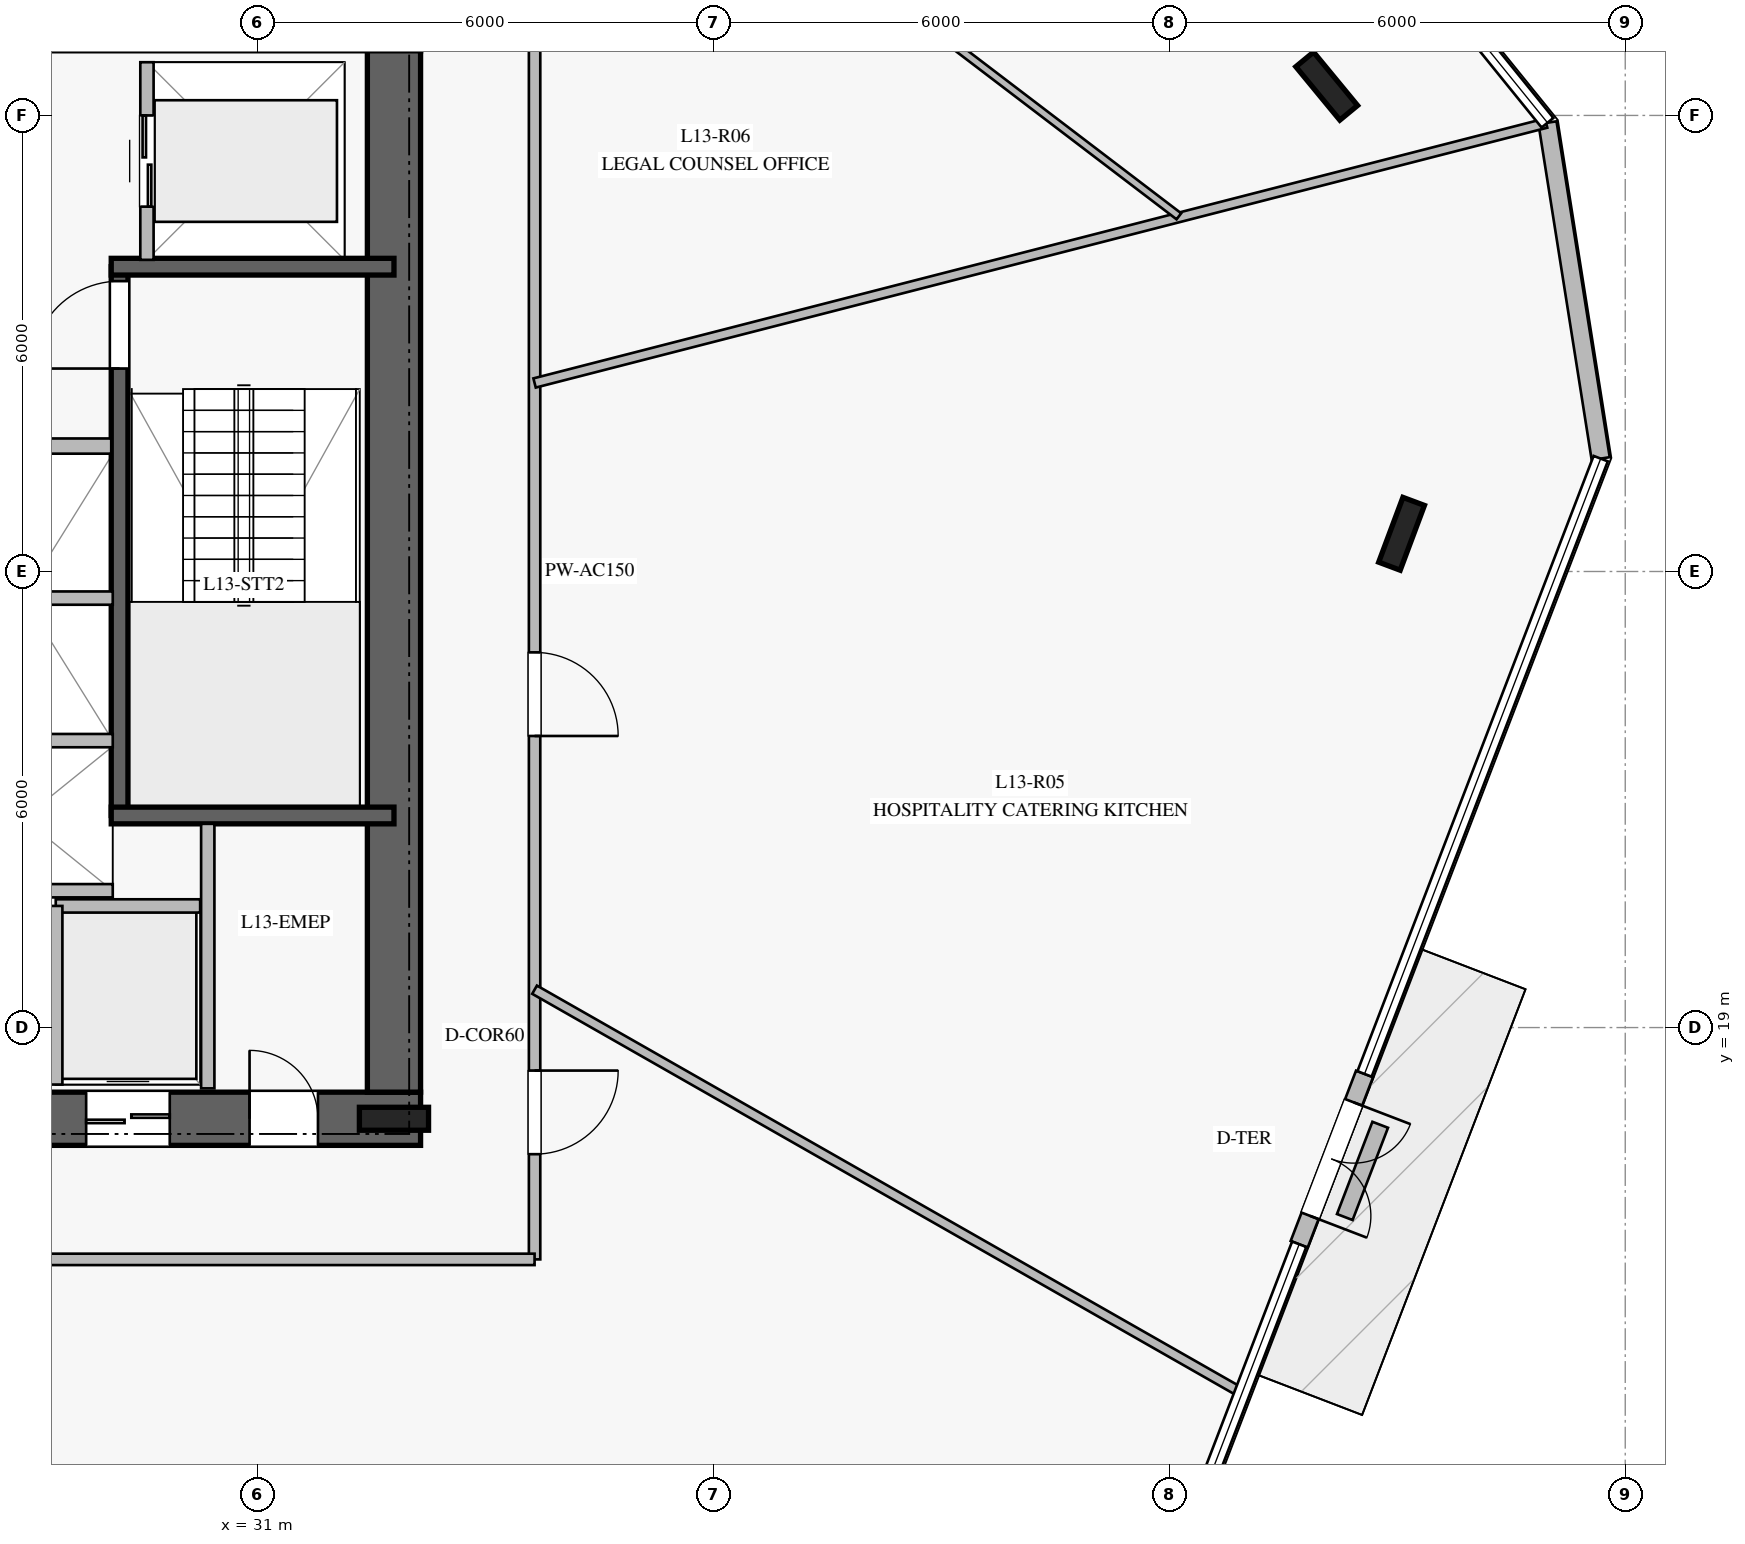
"""IFC4 building model, lengths in metres.
Left out: names, types, materials, properties, quantities, classifications, styles, units other than length and angle.
Written with IfcOpenShell. Run it as: python <this file> out.ifc"""

import sys

from ifc_helpers import new_model, si_unit, direction, frame, frame_2d, origin, origin_2d, place, context, subcontext, project, spatial, rectangle, i_section, extrude, element, fill, save


model = new_model("IFC4")
c1 = context("Model", 3, precision=1e-05, world=origin(), true_north=direction((0.0, 1.0)))
c2 = subcontext(c1, "Body", "Model", "MODEL_VIEW")
j1 = project(units=[si_unit("LENGTHUNIT", "METRE"), si_unit("PLANEANGLEUNIT", "RADIAN")], contexts=[c1])
p1 = place(None, origin())
s1 = spatial("IfcSite", under=j1, at=p1, CompositionType="ELEMENT")
p2 = place(p1, origin())
s2 = spatial("IfcBuilding", under=s1, at=p2, CompositionType="ELEMENT")
p3 = place(p2, frame((0.0, 0.0, 56.0)))
s3 = spatial("IfcBuildingStorey", under=s2, at=p3, CompositionType="ELEMENT", Elevation=56.0)
p4 = place(p3, frame((16.85, 17.8, 0.0), z_axis=(0.0, 0.0, 1.0), x_axis=(1.0, 0.0, 0.0)))
e1 = element("IfcWall", 1, at=p4, inside=s3, PredefinedType="SHEAR", context=c2, shape_type="SweptSolid", body=[
    extrude(rectangle(XDim=16.3, YDim=0.7, at=frame_2d((8.15, 0.0))), origin(), (0.0, 0.0, 1.0), 3.76),
])
p5 = place(p4, frame((5.1, 0.0, 0.0)))
e2 = element("IfcOpeningElement", 2, at=p5, cuts=e1, PredefinedType="OPENING", context=c2, shape_type="SweptSolid", body=[
    extrude(rectangle(XDim=1.2, YDim=2.25, at=frame_2d((0.6, 1.125))), frame((0.0, 0.36, 0.0), z_axis=(0.0, -1.0, 0.0), x_axis=(1.0, 0.0, 0.0)), (0.0, 0.0, 1.0), 0.72),
])
p6 = place(p4, frame((14.05, 0.0, 0.0)))
e3 = element("IfcOpeningElement", 3, at=p6, cuts=e1, PredefinedType="OPENING", context=c2, shape_type="SweptSolid", body=[
    extrude(rectangle(XDim=0.9, YDim=2.1, at=frame_2d((0.45, 1.05))), frame((0.0, 0.36, 0.0), z_axis=(0.0, -1.0, 0.0), x_axis=(1.0, 0.0, 0.0)), (0.0, 0.0, 1.0), 0.72),
])
p7 = place(p4, frame((7.95, 0.0, 0.0)))
e4 = element("IfcOpeningElement", 4, at=p7, cuts=e1, PredefinedType="OPENING", context=c2, shape_type="SweptSolid", body=[
    extrude(rectangle(XDim=1.1, YDim=2.2, at=frame_2d((0.55, 1.1))), frame((0.0, 0.36, 0.0), z_axis=(0.0, -1.0, 0.0), x_axis=(1.0, 0.0, 0.0)), (0.0, 0.0, 1.0), 0.72),
])
p8 = place(p4, frame((9.925, 0.0, 0.0)))
e5 = element("IfcOpeningElement", 5, at=p8, cuts=e1, PredefinedType="OPENING", context=c2, shape_type="SweptSolid", body=[
    extrude(rectangle(XDim=1.1, YDim=2.2, at=frame_2d((0.55, 1.1))), frame((0.0, 0.36, 0.0), z_axis=(0.0, -1.0, 0.0), x_axis=(1.0, 0.0, 0.0)), (0.0, 0.0, 1.0), 0.72),
])
p9 = place(p4, frame((11.9, 0.0, 0.0)))
e6 = element("IfcOpeningElement", 6, at=p9, cuts=e1, PredefinedType="OPENING", context=c2, shape_type="SweptSolid", body=[
    extrude(rectangle(XDim=1.1, YDim=2.2, at=frame_2d((0.55, 1.1))), frame((0.0, 0.36, 0.0), z_axis=(0.0, -1.0, 0.0), x_axis=(1.0, 0.0, 0.0)), (0.0, 0.0, 1.0), 0.72),
])
p10 = place(p3, frame((32.8, 18.15, 0.0), z_axis=(0.0, 0.0, 1.0), x_axis=(0.0, 1.0, 0.0)))
e7 = element("IfcWall", 7, at=p10, inside=s3, PredefinedType="SHEAR", context=c2, shape_type="SweptSolid", body=[
    extrude(rectangle(XDim=13.7, YDim=0.7, at=frame_2d((6.85, 0.0))), origin(), (0.0, 0.0, 1.0), 3.76),
])
for number, where, z_axis, x_axis in (
    (8, (32.8, 17.8, 0.0), (0.0, 0.0, 1.0), (1.0, 0.0, 0.0)),
    (9, (32.8, 32.2, 0.0), (0.0, 0.0, 1.0), (1.0, 0.0, 0.0)),
):
    element("IfcColumn", number, at=place(p3, frame(where, z_axis=z_axis, x_axis=x_axis)), inside=s3, PredefinedType="COLUMN", context=c2, shape_type="SweptSolid", body=[
        extrude(i_section(OverallWidth=0.302, OverallDepth=0.91, WebThickness=0.021, FlangeThickness=0.04, at=origin_2d()), origin(), (0.0, 0.0, 1.0), 4.0),
    ])
p11 = place(p3, frame((29.19, 21.79, 0.0), z_axis=(0.0, 0.0, 1.0), x_axis=(0.0, 1.0, 0.0)))
e10 = element("IfcWall", 10, at=p11, inside=s3, PredefinedType="SOLIDWALL", context=c2, shape_type="SweptSolid", body=[
    extrude(rectangle(XDim=7.22, YDim=0.22, at=frame_2d((3.61, 0.0))), origin(), (0.0, 0.0, 1.0), 3.76),
])
p12 = place(p11, frame((5.88, 0.0, 0.0)))
e11 = element("IfcOpeningElement", 11, at=p12, cuts=e10, PredefinedType="OPENING", context=c2, shape_type="SweptSolid", body=[
    extrude(rectangle(XDim=1.15, YDim=2.2, at=frame_2d((0.575, 1.1))), frame((0.0, 0.12, 0.0), z_axis=(0.0, -1.0, 0.0), x_axis=(1.0, 0.0, 0.0)), (0.0, 0.0, 1.0), 0.24),
])
for number, where, z_axis, x_axis in (
    (12, (29.08, 21.79, 0.0), (0.0, 0.0, 1.0), (1.0, 0.0, 0.0)),
    (13, (29.08, 29.01, 0.0), (0.0, 0.0, 1.0), (1.0, 0.0, 0.0)),
):
    element("IfcWall", number, at=place(p3, frame(where, z_axis=z_axis, x_axis=x_axis)), inside=s3, PredefinedType="SOLIDWALL", context=c2, shape_type="SweptSolid", body=[
        extrude(rectangle(XDim=3.72, YDim=0.22, at=frame_2d((1.86, 0.0))), origin(), (0.0, 0.0, 1.0), 3.76),
    ])
for number, where, z_axis, x_axis in (
    (14, (45.072, 31.386, 0.0), (0.0, 0.0, 1.0), (-0.636, 0.772, 0.0)),
    (15, (46.057, 25.496, 0.0), (0.0, 0.0, 1.0), (0.35, 0.937, 0.0)),
):
    element("IfcColumn", number, at=place(p3, frame(where, z_axis=z_axis, x_axis=x_axis)), inside=s3, PredefinedType="COLUMN", context=c2, shape_type="SweptSolid", body=[
        extrude(i_section(OverallWidth=0.302, OverallDepth=0.91, WebThickness=0.021, FlangeThickness=0.04, at=origin_2d()), origin(), (0.0, 0.0, 1.0), 4.0),
    ])
p13 = place(p3, frame((44.71, 16.149, 0.0), z_axis=(0.0, 0.0, 1.0), x_axis=(0.35832469106, 0.933597030724, 0.0)))
e16 = element("IfcWall", 16, at=p13, inside=s3, PredefinedType="STANDARD", context=c2, shape_type="SweptSolid", body=[
    extrude(rectangle(XDim=2.4, YDim=0.24, at=frame_2d((1.2, 0.0))), origin(), (0.0, 0.0, 1.0), 3.76),
])
p14 = place(p13, frame((0.4, 0.0, 0.0)))
e17 = element("IfcOpeningElement", 17, at=p14, cuts=e16, PredefinedType="OPENING", context=c2, shape_type="SweptSolid", body=[
    extrude(rectangle(XDim=1.6, YDim=2.25, at=frame_2d((0.8, 1.125))), frame((0.0, 0.13, 0.0), z_axis=(0.0, -1.0, 0.0), x_axis=(1.0, 0.0, 0.0)), (0.0, 0.0, 1.0), 0.26),
])
p15 = place(p3, frame((48.677, 26.485, 0.0), z_axis=(0.0, 0.0, 1.0), x_axis=(-0.156447327705, 0.987686303263, 0.0)))
e18 = element("IfcWall", 18, at=p15, inside=s3, PredefinedType="STANDARD", context=c2, shape_type="SweptSolid", body=[
    extrude(rectangle(XDim=4.474, YDim=0.24, at=frame_2d((2.237, 0.0))), origin(), (0.0, 0.0, 1.0), 3.76),
])
p16 = place(p3, frame((45.31, 16.507, 0.0), z_axis=(0.0, 0.0, 1.0), x_axis=(0.358274337513, 0.933616355405, 0.0)))
e19 = element("IfcWall", 19, at=p16, inside=s3, PredefinedType="USERDEFINED", context=c2, shape_type="SweptSolid", body=[
    extrude(rectangle(XDim=1.3, YDim=0.22, at=frame_2d((0.65, 0.0))), origin(), (0.0, 0.0, 1.0), 0.4),
])
p17 = place(p3, frame((25.7, 26.65, 0.0), z_axis=(0.0, 0.0, 1.0), x_axis=(1.0, 0.0, 0.0)))
e20 = element("IfcWall", 20, at=p17, inside=s3, PredefinedType="PARTITIONING", context=c2, shape_type="SweptSolid", body=[
    extrude(rectangle(XDim=3.38, YDim=0.2, at=frame_2d((1.69, 0.0))), origin(), (0.0, 0.0, 1.0), 3.76),
])
p18 = place(p3, frame((30.35, 18.2, 0.0), z_axis=(0.0, 0.0, 1.0), x_axis=(0.0, 1.0, 0.0)))
e21 = element("IfcWall", 21, at=p18, inside=s3, PredefinedType="PARTITIONING", context=c2, shape_type="SweptSolid", body=[
    extrude(rectangle(XDim=3.48, YDim=0.175, at=frame_2d((1.74, 0.0))), origin(), (0.0, 0.0, 1.0), 3.76),
])
p19 = place(p3, frame((28.35, 20.6, 0.0), z_axis=(0.0, 0.0, 1.0), x_axis=(1.0, 0.0, 0.0)))
e22 = element("IfcWall", 22, at=p19, inside=s3, PredefinedType="PARTITIONING", context=c2, shape_type="SweptSolid", body=[
    extrude(rectangle(XDim=1.9, YDim=0.175, at=frame_2d((0.95, 0.0))), origin(), (0.0, 0.0, 1.0), 3.76),
])
for number, where, z_axis, x_axis in (
    (23, (28.35, 18.25, 0.0), (0.0, 0.0, 1.0), (0.0, 1.0, 0.0)),
    (24, (26.75, 20.8, 0.0), (0.0, 0.0, 1.0), (1.0, 0.0, 0.0)),
    (25, (26.75, 22.775, 0.0), (0.0, 0.0, 1.0), (1.0, 0.0, 0.0)),
    (26, (26.75, 24.65, 0.0), (0.0, 0.0, 1.0), (1.0, 0.0, 0.0)),
):
    element("IfcWall", number, at=place(p3, frame(where, z_axis=z_axis, x_axis=x_axis)), inside=s3, PredefinedType="PARTITIONING", context=c2, shape_type="SweptSolid", body=[
        extrude(rectangle(XDim=2.35, YDim=0.175, at=frame_2d((1.175, 0.0))), origin(), (0.0, 0.0, 1.0), 3.76),
    ])
p20 = place(p3, frame((29.55, 29.1, 0.0), z_axis=(0.0, 0.0, 1.0), x_axis=(0.0, 1.0, 0.0)))
e27 = element("IfcWall", 27, at=p20, inside=s3, PredefinedType="PARTITIONING", context=c2, shape_type="SweptSolid", body=[
    extrude(rectangle(XDim=2.6, YDim=0.175, at=frame_2d((1.3, 0.0))), origin(), (0.0, 0.0, 1.0), 3.76),
])
p21 = place(p20, frame((0.7, 0.0, 0.0)))
e28 = element("IfcOpeningElement", 28, at=p21, cuts=e27, PredefinedType="OPENING", context=c2, shape_type="SweptSolid", body=[
    extrude(rectangle(XDim=1.2, YDim=2.2, at=frame_2d((0.6, 1.1))), frame((0.0, 0.098, 0.0), z_axis=(0.0, -1.0, 0.0), x_axis=(1.0, 0.0, 0.0)), (0.0, 0.0, 1.0), 0.195),
])
p22 = place(p3, frame((34.65, 34.05, 0.0), z_axis=(0.0, 0.0, 1.0), x_axis=(0.0, -1.0, 0.0)))
e29 = element("IfcWall", 29, at=p22, inside=s3, PredefinedType="PARTITIONING", context=c2, shape_type="SweptSolid", body=[
    extrude(rectangle(XDim=18.1, YDim=0.15, at=frame_2d((9.05, 0.0))), origin(), (0.0, 0.0, 1.0), 3.21),
])
p23 = place(p22, frame((15.616, 0.0, 0.0)))
e30 = element("IfcOpeningElement", 30, at=p23, cuts=e29, PredefinedType="OPENING", context=c2, shape_type="SweptSolid", body=[
    extrude(rectangle(XDim=1.1, YDim=2.2, at=frame_2d((0.55, 1.1))), frame((0.0, 0.085, 0.0), z_axis=(0.0, -1.0, 0.0), x_axis=(1.0, 0.0, 0.0)), (0.0, 0.0, 1.0), 0.17),
])
p24 = place(p22, frame((10.114, 0.0, 0.0)))
e31 = element("IfcOpeningElement", 31, at=p24, cuts=e29, PredefinedType="OPENING", context=c2, shape_type="SweptSolid", body=[
    extrude(rectangle(XDim=1.1, YDim=2.2, at=frame_2d((0.55, 1.1))), frame((0.0, 0.085, 0.0), z_axis=(0.0, -1.0, 0.0), x_axis=(1.0, 0.0, 0.0)), (0.0, 0.0, 1.0), 0.17),
])
p25 = place(p3, frame((34.65, 15.95, 0.0), z_axis=(0.0, 0.0, 1.0), x_axis=(-1.0, 0.0, 0.0)))
e32 = element("IfcWall", 32, at=p25, inside=s3, PredefinedType="PARTITIONING", context=c2, shape_type="SweptSolid", body=[
    extrude(rectangle(XDim=19.3, YDim=0.15, at=frame_2d((9.65, 0.0))), origin(), (0.0, 0.0, 1.0), 3.21),
])
p26 = place(p25, frame((13.02, 0.0, 0.0)))
e33 = element("IfcOpeningElement", 33, at=p26, cuts=e32, PredefinedType="OPENING", context=c2, shape_type="SweptSolid", body=[
    extrude(rectangle(XDim=1.1, YDim=2.2, at=frame_2d((0.55, 1.1))), frame((0.0, 0.085, 0.0), z_axis=(0.0, -1.0, 0.0), x_axis=(1.0, 0.0, 0.0)), (0.0, 0.0, 1.0), 0.17),
])
p27 = place(p3, frame((26.433, 15.95, 0.0), z_axis=(0.0, 0.0, 1.0), x_axis=(0.156473474013, -0.987682161391, 0.0)))
e34 = element("IfcWall", 34, at=p27, inside=s3, PredefinedType="PARTITIONING", context=c2, shape_type="SweptSolid", body=[
    extrude(rectangle(XDim=12.392, YDim=0.125, at=frame_2d((6.196, 0.0))), origin(), (0.0, 0.0, 1.0), 3.05),
])
p28 = place(p3, frame((34.65, 19.498, 0.0), z_axis=(0.0, 0.0, 1.0), x_axis=(0.868738483575, -0.495271084515, 0.0)))
e35 = element("IfcWall", 35, at=p28, inside=s3, PredefinedType="PARTITIONING", context=c2, shape_type="SweptSolid", body=[
    extrude(rectangle(XDim=10.697, YDim=0.125, at=frame_2d((5.349, 0.0))), origin(), (0.0, 0.0, 1.0), 3.06),
])
p29 = place(p3, frame((34.65, 27.48, 0.0), z_axis=(0.0, 0.0, 1.0), x_axis=(0.96855240957, 0.248809625851, 0.0)))
e36 = element("IfcWall", 36, at=p29, inside=s3, PredefinedType="PARTITIONING", context=c2, shape_type="SweptSolid", body=[
    extrude(rectangle(XDim=13.741, YDim=0.125, at=frame_2d((6.871, 0.0))), origin(), (0.0, 0.0, 1.0), 3.06),
])
p30 = place(p3, frame((43.127, 29.673, 0.0), z_axis=(0.0, 0.0, 1.0), x_axis=(-0.795608764692, 0.605810773712, 0.0)))
e37 = element("IfcWall", 37, at=p30, inside=s3, PredefinedType="MOVABLE", context=c2, shape_type="SweptSolid", body=[
    extrude(rectangle(XDim=14.4, YDim=0.1, at=frame_2d((7.2, 0.0))), origin(), (0.0, 0.0, 1.0), 3.21),
])
p31 = place(p30, frame((6.611, 0.0, 0.0)))
e38 = element("IfcOpeningElement", 38, at=p31, cuts=e37, PredefinedType="OPENING", context=c2, shape_type="SweptSolid", body=[
    extrude(rectangle(XDim=1.0, YDim=2.15, at=frame_2d((0.5, 1.075))), frame((0.0, 0.06, 0.0), z_axis=(0.0, -1.0, 0.0), x_axis=(1.0, 0.0, 0.0)), (0.0, 0.0, 1.0), 0.12),
])
p32 = place(p14, frame((1.6, 0.0, 0.0), z_axis=(0.0, 0.0, 1.0), x_axis=(-1.0, 0.0, 0.0)))
e39 = element("IfcDoor", 39, at=p32, inside=s3, OperationType="DOUBLE_DOOR_SINGLE_SWING", PredefinedType="DOOR", context=c2, shape_type="SweptSolid", body=[
    extrude(rectangle(XDim=1.6, YDim=2.25, at=frame_2d((0.8, 1.125))), frame((0.0, 0.025, 0.0), z_axis=(0.0, -1.0, 0.0), x_axis=(1.0, 0.0, 0.0)), (0.0, 0.0, 1.0), 0.05),
])
fill(e17, e39)
p33 = place(p12, origin())
e40 = element("IfcDoor", 40, at=p33, inside=s3, OperationType="SINGLE_SWING_LEFT", PredefinedType="DOOR", context=c2, shape_type="SweptSolid", body=[
    extrude(rectangle(XDim=1.15, YDim=2.2, at=frame_2d((0.575, 1.1))), frame((0.0, 0.025, 0.0), z_axis=(0.0, -1.0, 0.0), x_axis=(1.0, 0.0, 0.0)), (0.0, 0.0, 1.0), 0.05),
])
fill(e11, e40)
p34 = place(p6, origin())
e41 = element("IfcDoor", 41, at=p34, inside=s3, OperationType="SINGLE_SWING_LEFT", PredefinedType="DOOR", context=c2, shape_type="SweptSolid", body=[
    extrude(rectangle(XDim=0.9, YDim=2.1, at=frame_2d((0.45, 1.05))), frame((0.0, 0.025, 0.0), z_axis=(0.0, -1.0, 0.0), x_axis=(1.0, 0.0, 0.0)), (0.0, 0.0, 1.0), 0.05),
])
fill(e3, e41)
p35 = place(p9, origin())
e42 = element("IfcDoor", 42, at=p35, inside=s3, OperationType="DOUBLE_DOOR_SLIDING", PredefinedType="DOOR", context=c2, shape_type="SweptSolid", body=[
    extrude(rectangle(XDim=1.1, YDim=2.2, at=frame_2d((0.55, 1.1))), frame((0.0, 0.025, 0.0), z_axis=(0.0, -1.0, 0.0), x_axis=(1.0, 0.0, 0.0)), (0.0, 0.0, 1.0), 0.05),
])
fill(e6, e42)
p36 = place(p21, origin())
e43 = element("IfcDoor", 43, at=p36, inside=s3, OperationType="DOUBLE_DOOR_SLIDING", PredefinedType="DOOR", context=c2, shape_type="SweptSolid", body=[
    extrude(rectangle(XDim=1.2, YDim=2.2, at=frame_2d((0.6, 1.1))), frame((0.0, 0.025, 0.0), z_axis=(0.0, -1.0, 0.0), x_axis=(1.0, 0.0, 0.0)), (0.0, 0.0, 1.0), 0.05),
])
fill(e28, e43)
p37 = place(p23, origin())
e44 = element("IfcDoor", 44, at=p37, inside=s3, OperationType="SINGLE_SWING_LEFT", PredefinedType="DOOR", context=c2, shape_type="SweptSolid", body=[
    extrude(rectangle(XDim=1.1, YDim=2.2, at=frame_2d((0.55, 1.1))), frame((0.0, 0.025, 0.0), z_axis=(0.0, -1.0, 0.0), x_axis=(1.0, 0.0, 0.0)), (0.0, 0.0, 1.0), 0.05),
])
fill(e30, e44)
p38 = place(p24, origin())
e45 = element("IfcDoor", 45, at=p38, inside=s3, OperationType="SINGLE_SWING_RIGHT", PredefinedType="DOOR", context=c2, shape_type="SweptSolid", body=[
    extrude(rectangle(XDim=1.1, YDim=2.2, at=frame_2d((0.55, 1.1))), frame((0.0, 0.025, 0.0), z_axis=(0.0, -1.0, 0.0), x_axis=(1.0, 0.0, 0.0)), (0.0, 0.0, 1.0), 0.05),
])
fill(e31, e45)
save(model, sys.argv[1])
